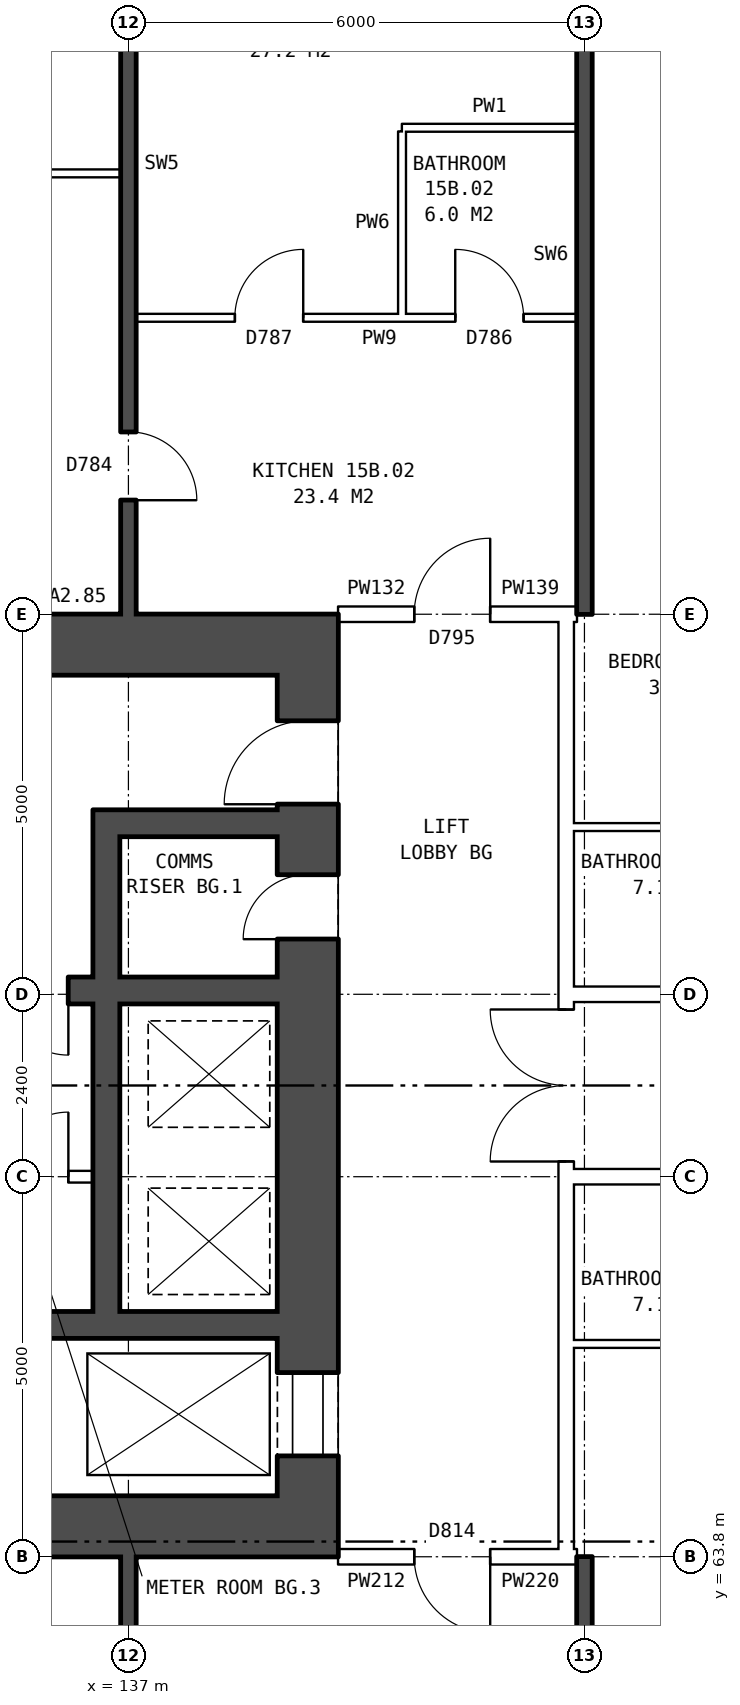
"""IFC4 building model, lengths in metres.
Left out: names, types, materials, properties, quantities, classifications, styles, units other than length and angle.
Written with IfcOpenShell. Run it as: python <this file> out.ifc"""

import sys

from ifc_helpers import new_model, si_unit, direction, frame, frame_2d, origin, place, context, subcontext, project, spatial, rectangle, extrude, element, fill, save


model = new_model("IFC4")
c1 = context("Model", 3, precision=1e-05, world=origin(), true_north=direction((0.0, 1.0)))
c2 = subcontext(c1, "Body", "Model", "MODEL_VIEW")
j1 = project(units=[si_unit("LENGTHUNIT", "METRE"), si_unit("PLANEANGLEUNIT", "RADIAN")], contexts=[c1])
p1 = place(None, origin())
s1 = spatial("IfcSite", under=j1, at=p1, CompositionType="ELEMENT")
p2 = place(p1, origin())
s2 = spatial("IfcBuilding", under=s1, at=p2, CompositionType="ELEMENT")
p3 = place(p2, frame((0.0, 0.0, 56.7)))
s3 = spatial("IfcBuildingStorey", under=s2, at=p3, CompositionType="ELEMENT", Elevation=56.7)
p4 = place(p3, frame((139.36, 64.6, 0.0), z_axis=(0.0, 0.0, 1.0), x_axis=(0.0, 1.0, 0.0)))
e1 = element("IfcWall", 1, at=p4, inside=s3, PredefinedType="SHEAR", context=c2, shape_type="SweptSolid", body=[
    extrude(rectangle(XDim=10.8, YDim=0.8, at=frame_2d((5.4, 0.0))), origin(), (0.0, 0.0, 1.0), 2.85),
])
p5 = place(p4, frame((0.525, 0.0, 0.0)))
e2 = element("IfcOpeningElement", 2, at=p5, cuts=e1, PredefinedType="OPENING", context=c2, shape_type="SweptSolid", body=[
    extrude(rectangle(XDim=1.1, YDim=2.1, at=frame_2d((0.55, 1.05))), frame((0.0, 0.41, 0.0), z_axis=(0.0, -1.0, 0.0), x_axis=(1.0, 0.0, 0.0)), (0.0, 0.0, 1.0), 0.82),
])
p6 = place(p4, frame((9.1, 0.0, 0.0)))
e3 = element("IfcOpeningElement", 3, at=p6, cuts=e1, PredefinedType="OPENING", context=c2, shape_type="SweptSolid", body=[
    extrude(rectangle(XDim=1.1, YDim=2.1, at=frame_2d((0.55, 1.05))), frame((0.0, 0.41, 0.0), z_axis=(0.0, -1.0, 0.0), x_axis=(1.0, 0.0, 0.0)), (0.0, 0.0, 1.0), 0.82),
])
p7 = place(p4, frame((7.325, 0.0, 0.0)))
e4 = element("IfcOpeningElement", 4, at=p7, cuts=e1, PredefinedType="OPENING", context=c2, shape_type="SweptSolid", body=[
    extrude(rectangle(XDim=0.85, YDim=2.1, at=frame_2d((0.425, 1.05))), frame((0.0, 0.41, 0.0), z_axis=(0.0, -1.0, 0.0), x_axis=(1.0, 0.0, 0.0)), (0.0, 0.0, 1.0), 0.82),
])
for number, where, z_axis, x_axis in (
    (5, (139.76, 64.2, 0.0), (0.0, 0.0, 1.0), (-1.0, 0.0, 0.0)),
    (6, (139.76, 75.8, 0.0), (0.0, 0.0, 1.0), (-1.0, 0.0, 0.0)),
):
    element("IfcWall", number, at=place(p3, frame(where, z_axis=z_axis, x_axis=x_axis)), inside=s3, PredefinedType="SHEAR", context=c2, shape_type="SweptSolid", body=[
        extrude(rectangle(XDim=8.4, YDim=0.8, at=frame_2d((4.2, 0.0))), origin(), (0.0, 0.0, 1.0), 2.85),
    ])
p8 = place(p3, frame((138.96, 66.85, 0.0), z_axis=(0.0, 0.0, 1.0), x_axis=(-1.0, 0.0, 0.0)))
e7 = element("IfcWall", 7, at=p8, inside=s3, PredefinedType="SHEAR", context=c2, shape_type="SweptSolid", body=[
    extrude(rectangle(XDim=3.925, YDim=0.35, at=frame_2d((1.962, 0.0))), origin(), (0.0, 0.0, 1.0), 2.85),
])
p9 = place(p3, frame((136.535, 68.8, 0.0), z_axis=(0.0, 0.0, 1.0), x_axis=(-1.0, 0.0, 0.0)))
e8 = element("IfcWall", 8, at=p9, inside=s3, PredefinedType="PARTITIONING", context=c2, shape_type="SweptSolid", body=[
    extrude(rectangle(XDim=1.5, YDim=0.15, at=frame_2d((0.75, 0.0))), origin(), (0.0, 0.0, 1.0), 2.85),
])
p10 = place(p9, frame((0.325, 0.0, 0.0)))
e9 = element("IfcOpeningElement", 9, at=p10, cuts=e8, PredefinedType="OPENING", context=c2, shape_type="SweptSolid", body=[
    extrude(rectangle(XDim=0.85, YDim=2.1, at=frame_2d((0.425, 1.05))), frame((0.0, 0.085, 0.0), z_axis=(0.0, -1.0, 0.0), x_axis=(1.0, 0.0, 0.0)), (0.0, 0.0, 1.0), 0.17),
])
p11 = place(p3, frame((138.96, 71.25, 0.0), z_axis=(0.0, 0.0, 1.0), x_axis=(-1.0, 0.0, 0.0)))
e10 = element("IfcWall", 10, at=p11, inside=s3, PredefinedType="SHEAR", context=c2, shape_type="SweptSolid", body=[
    extrude(rectangle(XDim=6.8, YDim=0.35, at=frame_2d((3.4, 0.0))), origin(), (0.0, 0.0, 1.0), 2.85),
])
p12 = place(p11, frame((4.425, 0.0, 0.0)))
e11 = element("IfcOpeningElement", 11, at=p12, cuts=e10, PredefinedType="OPENING", context=c2, shape_type="SweptSolid", body=[
    extrude(rectangle(XDim=1.1, YDim=2.1, at=frame_2d((0.55, 1.05))), frame((0.0, 0.185, 0.0), z_axis=(0.0, -1.0, 0.0), x_axis=(1.0, 0.0, 0.0)), (0.0, 0.0, 1.0), 0.37),
])
p13 = place(p11, frame((2.75, 0.0, 0.0)))
e12 = element("IfcOpeningElement", 12, at=p13, cuts=e10, PredefinedType="OPENING", context=c2, shape_type="SweptSolid", body=[
    extrude(rectangle(XDim=0.85, YDim=2.1, at=frame_2d((0.425, 1.05))), frame((0.0, 0.185, 0.0), z_axis=(0.0, -1.0, 0.0), x_axis=(1.0, 0.0, 0.0)), (0.0, 0.0, 1.0), 0.37),
])
p14 = place(p3, frame((138.96, 73.45, 0.0), z_axis=(0.0, 0.0, 1.0), x_axis=(-1.0, 0.0, 0.0)))
e13 = element("IfcWall", 13, at=p14, inside=s3, PredefinedType="SHEAR", context=c2, shape_type="SweptSolid", body=[
    extrude(rectangle(XDim=2.075, YDim=0.35, at=frame_2d((1.038, 0.0))), origin(), (0.0, 0.0, 1.0), 2.85),
])
p15 = place(p3, frame((136.71, 67.025, 0.0), z_axis=(0.0, 0.0, 1.0), x_axis=(0.0, 1.0, 0.0)))
e14 = element("IfcWall", 14, at=p15, inside=s3, PredefinedType="SHEAR", context=c2, shape_type="SweptSolid", body=[
    extrude(rectangle(XDim=4.05, YDim=0.35, at=frame_2d((2.025, 0.0))), origin(), (0.0, 0.0, 1.0), 2.85),
])
p16 = place(p3, frame((136.71, 71.425, 0.0), z_axis=(0.0, 0.0, 1.0), x_axis=(0.0, 1.0, 0.0)))
e15 = element("IfcWall", 15, at=p16, inside=s3, PredefinedType="SHEAR", context=c2, shape_type="SweptSolid", body=[
    extrude(rectangle(XDim=2.2, YDim=0.35, at=frame_2d((1.1, 0.0))), origin(), (0.0, 0.0, 1.0), 2.85),
])
p17 = place(p3, frame((142.76, 63.9, 0.0), z_axis=(0.0, 0.0, 1.0), x_axis=(0.0, 1.0, 0.0)))
e16 = element("IfcWall", 16, at=p17, inside=s3, PredefinedType="PARTITIONING", context=c2, shape_type="SweptSolid", body=[
    extrude(rectangle(XDim=12.2, YDim=0.2, at=frame_2d((6.1, 0.0))), origin(), (0.0, 0.0, 1.0), 2.85),
])
p18 = place(p17, frame((5.1, 0.0, 0.0)))
e17 = element("IfcOpeningElement", 17, at=p18, cuts=e16, PredefinedType="OPENING", context=c2, shape_type="SweptSolid", body=[
    extrude(rectangle(XDim=2.0, YDim=2.1, at=frame_2d((1.0, 1.05))), frame((0.0, 0.11, 0.0), z_axis=(0.0, -1.0, 0.0), x_axis=(1.0, 0.0, 0.0)), (0.0, 0.0, 1.0), 0.22),
])
p19 = place(p3, frame((139.76, 63.8, 0.0), z_axis=(0.0, 0.0, 1.0), x_axis=(1.0, 0.0, 0.0)))
e18 = element("IfcWall", 18, at=p19, inside=s3, PredefinedType="PARTITIONING", context=c2, shape_type="SweptSolid", body=[
    extrude(rectangle(XDim=3.0, YDim=0.2, at=frame_2d((1.5, 0.0))), origin(), (0.0, 0.0, 1.0), 2.85),
])
p20 = place(p19, frame((1.0, 0.0, 0.0)))
e19 = element("IfcOpeningElement", 19, at=p20, cuts=e18, PredefinedType="OPENING", context=c2, shape_type="SweptSolid", body=[
    extrude(rectangle(XDim=1.0, YDim=2.1, at=frame_2d((0.5, 1.05))), frame((0.0, 0.11, 0.0), z_axis=(0.0, -1.0, 0.0), x_axis=(1.0, 0.0, 0.0)), (0.0, 0.0, 1.0), 0.22),
])
p21 = place(p3, frame((142.76, 63.8, 0.0), z_axis=(0.0, 0.0, 1.0), x_axis=(1.0, 0.0, 0.0)))
e20 = element("IfcWall", 20, at=p21, inside=s3, PredefinedType="PARTITIONING", context=c2, shape_type="SweptSolid", body=[
    extrude(rectangle(XDim=0.14, YDim=0.2, at=frame_2d((0.07, 0.0))), origin(), (0.0, 0.0, 1.0), 2.85),
])
p22 = place(p3, frame((142.76, 66.6, 0.0), z_axis=(0.0, 0.0, 1.0), x_axis=(1.0, 0.0, 0.0)))
e21 = element("IfcWall", 21, at=p22, inside=s3, PredefinedType="PARTITIONING", context=c2, shape_type="SweptSolid", body=[
    extrude(rectangle(XDim=3.24, YDim=0.1, at=frame_2d((1.62, 0.0))), origin(), (0.0, 0.0, 1.0), 2.85),
])
p23 = place(p3, frame((142.76, 68.8, 0.0), z_axis=(0.0, 0.0, 1.0), x_axis=(1.0, 0.0, 0.0)))
e22 = element("IfcWall", 22, at=p23, inside=s3, PredefinedType="PARTITIONING", context=c2, shape_type="SweptSolid", body=[
    extrude(rectangle(XDim=14.48, YDim=0.2, at=frame_2d((7.24, 0.0))), origin(), (0.0, 0.0, 1.0), 2.85),
])
p24 = place(p23, frame((4.24, 0.0, 0.0)))
e23 = element("IfcOpeningElement", 23, at=p24, cuts=e22, PredefinedType="OPENING", context=c2, shape_type="SweptSolid", body=[
    extrude(rectangle(XDim=1.0, YDim=2.1, at=frame_2d((0.5, 1.05))), frame((0.0, 0.11, 0.0), z_axis=(0.0, -1.0, 0.0), x_axis=(1.0, 0.0, 0.0)), (0.0, 0.0, 1.0), 0.22),
])
p25 = place(p23, frame((7.24, 0.0, 0.0)))
e24 = element("IfcOpeningElement", 24, at=p25, cuts=e22, PredefinedType="OPENING", context=c2, shape_type="SweptSolid", body=[
    extrude(rectangle(XDim=1.0, YDim=2.1, at=frame_2d((0.5, 1.05))), frame((0.0, 0.11, 0.0), z_axis=(0.0, -1.0, 0.0), x_axis=(1.0, 0.0, 0.0)), (0.0, 0.0, 1.0), 0.22),
])
p26 = place(p3, frame((142.76, 71.2, 0.0), z_axis=(0.0, 0.0, 1.0), x_axis=(1.0, 0.0, 0.0)))
e25 = element("IfcWall", 25, at=p26, inside=s3, PredefinedType="PARTITIONING", context=c2, shape_type="SweptSolid", body=[
    extrude(rectangle(XDim=14.48, YDim=0.2, at=frame_2d((7.24, 0.0))), origin(), (0.0, 0.0, 1.0), 2.85),
])
p27 = place(p26, frame((4.24, 0.0, 0.0)))
e26 = element("IfcOpeningElement", 26, at=p27, cuts=e25, PredefinedType="OPENING", context=c2, shape_type="SweptSolid", body=[
    extrude(rectangle(XDim=1.0, YDim=2.1, at=frame_2d((0.5, 1.05))), frame((0.0, 0.11, 0.0), z_axis=(0.0, -1.0, 0.0), x_axis=(1.0, 0.0, 0.0)), (0.0, 0.0, 1.0), 0.22),
])
p28 = place(p26, frame((7.24, 0.0, 0.0)))
e27 = element("IfcOpeningElement", 27, at=p28, cuts=e25, PredefinedType="OPENING", context=c2, shape_type="SweptSolid", body=[
    extrude(rectangle(XDim=1.0, YDim=2.1, at=frame_2d((0.5, 1.05))), frame((0.0, 0.11, 0.0), z_axis=(0.0, -1.0, 0.0), x_axis=(1.0, 0.0, 0.0)), (0.0, 0.0, 1.0), 0.22),
])
p29 = place(p3, frame((142.76, 73.4, 0.0), z_axis=(0.0, 0.0, 1.0), x_axis=(1.0, 0.0, 0.0)))
e28 = element("IfcWall", 28, at=p29, inside=s3, PredefinedType="PARTITIONING", context=c2, shape_type="SweptSolid", body=[
    extrude(rectangle(XDim=3.24, YDim=0.1, at=frame_2d((1.62, 0.0))), origin(), (0.0, 0.0, 1.0), 2.85),
])
p30 = place(p3, frame((139.76, 76.2, 0.0), z_axis=(0.0, 0.0, 1.0), x_axis=(1.0, 0.0, 0.0)))
e29 = element("IfcWall", 29, at=p30, inside=s3, PredefinedType="PARTITIONING", context=c2, shape_type="SweptSolid", body=[
    extrude(rectangle(XDim=3.0, YDim=0.2, at=frame_2d((1.5, 0.0))), origin(), (0.0, 0.0, 1.0), 2.85),
])
p31 = place(p30, frame((1.0, 0.0, 0.0)))
e30 = element("IfcOpeningElement", 30, at=p31, cuts=e29, PredefinedType="OPENING", context=c2, shape_type="SweptSolid", body=[
    extrude(rectangle(XDim=1.0, YDim=2.1, at=frame_2d((0.5, 1.05))), frame((0.0, 0.11, 0.0), z_axis=(0.0, -1.0, 0.0), x_axis=(1.0, 0.0, 0.0)), (0.0, 0.0, 1.0), 0.22),
])
p32 = place(p3, frame((142.76, 76.2, 0.0), z_axis=(0.0, 0.0, 1.0), x_axis=(1.0, 0.0, 0.0)))
e31 = element("IfcWall", 31, at=p32, inside=s3, PredefinedType="PARTITIONING", context=c2, shape_type="SweptSolid", body=[
    extrude(rectangle(XDim=0.14, YDim=0.2, at=frame_2d((0.07, 0.0))), origin(), (0.0, 0.0, 1.0), 2.85),
])
p33 = place(p3, frame((137.1, 80.1, 0.0), z_axis=(0.0, 0.0, 1.0), x_axis=(1.0, 0.0, 0.0)))
e32 = element("IfcWall", 32, at=p33, inside=s3, PredefinedType="PARTITIONING", context=c2, shape_type="SweptSolid", body=[
    extrude(rectangle(XDim=5.8, YDim=0.1, at=frame_2d((2.9, 0.0))), origin(), (0.0, 0.0, 1.0), 2.85),
])
p34 = place(p33, frame((1.3, 0.0, 0.0)))
e33 = element("IfcOpeningElement", 33, at=p34, cuts=e32, PredefinedType="OPENING", context=c2, shape_type="SweptSolid", body=[
    extrude(rectangle(XDim=0.9, YDim=2.1, at=frame_2d((0.45, 1.05))), frame((0.0, 0.06, 0.0), z_axis=(0.0, -1.0, 0.0), x_axis=(1.0, 0.0, 0.0)), (0.0, 0.0, 1.0), 0.12),
])
p35 = place(p33, frame((4.2, 0.0, 0.0)))
e34 = element("IfcOpeningElement", 34, at=p35, cuts=e32, PredefinedType="OPENING", context=c2, shape_type="SweptSolid", body=[
    extrude(rectangle(XDim=0.9, YDim=2.1, at=frame_2d((0.45, 1.05))), frame((0.0, 0.06, 0.0), z_axis=(0.0, -1.0, 0.0), x_axis=(1.0, 0.0, 0.0)), (0.0, 0.0, 1.0), 0.12),
])
p36 = place(p3, frame((131.36, 82.0, 0.0), z_axis=(0.0, 0.0, 1.0), x_axis=(1.0, 0.0, 0.0)))
e35 = element("IfcWall", 35, at=p36, inside=s3, PredefinedType="PARTITIONING", context=c2, shape_type="SweptSolid", body=[
    extrude(rectangle(XDim=5.54, YDim=0.1, at=frame_2d((2.77, 0.0))), origin(), (0.0, 0.0, 1.0), 2.85),
])
p37 = place(p36, frame((2.32, 0.0, 0.0)))
e36 = element("IfcOpeningElement", 36, at=p37, cuts=e35, PredefinedType="OPENING", context=c2, shape_type="SweptSolid", body=[
    extrude(rectangle(XDim=0.9, YDim=2.1, at=frame_2d((0.45, 1.05))), frame((0.0, 0.06, 0.0), z_axis=(0.0, -1.0, 0.0), x_axis=(1.0, 0.0, 0.0)), (0.0, 0.0, 1.0), 0.12),
])
p38 = place(p3, frame((140.6, 82.6, 0.0), z_axis=(0.0, 0.0, 1.0), x_axis=(1.0, 0.0, 0.0)))
e37 = element("IfcWall", 37, at=p38, inside=s3, PredefinedType="PARTITIONING", context=c2, shape_type="SweptSolid", body=[
    extrude(rectangle(XDim=2.3, YDim=0.1, at=frame_2d((1.15, 0.0))), origin(), (0.0, 0.0, 1.0), 2.85),
])
p39 = place(p3, frame((137.0, 54.36, 0.0), z_axis=(0.0, 0.0, 1.0), x_axis=(0.0, 1.0, 0.0)))
e38 = element("IfcWall", 38, at=p39, inside=s3, PredefinedType="SOLIDWALL", context=c2, shape_type="SweptSolid", body=[
    extrude(rectangle(XDim=9.44, YDim=0.2, at=frame_2d((4.72, 0.0))), origin(), (0.0, 0.0, 1.0), 2.85),
])
p40 = place(p39, frame((2.47, 0.0, 0.0)))
e39 = element("IfcOpeningElement", 39, at=p40, cuts=e38, PredefinedType="OPENING", context=c2, shape_type="SweptSolid", body=[
    extrude(rectangle(XDim=0.9, YDim=2.1, at=frame_2d((0.45, 1.05))), frame((0.0, 0.11, 0.0), z_axis=(0.0, -1.0, 0.0), x_axis=(1.0, 0.0, 0.0)), (0.0, 0.0, 1.0), 0.22),
])
p41 = place(p39, frame((7.59, 0.0, 0.0)))
e40 = element("IfcOpeningElement", 40, at=p41, cuts=e38, PredefinedType="OPENING", context=c2, shape_type="SweptSolid", body=[
    extrude(rectangle(XDim=0.9, YDim=2.1, at=frame_2d((0.45, 1.05))), frame((0.0, 0.11, 0.0), z_axis=(0.0, -1.0, 0.0), x_axis=(1.0, 0.0, 0.0)), (0.0, 0.0, 1.0), 0.22),
])
p42 = place(p3, frame((137.0, 76.2, 0.0), z_axis=(0.0, 0.0, 1.0), x_axis=(0.0, 1.0, 0.0)))
e41 = element("IfcWall", 41, at=p42, inside=s3, PredefinedType="SOLIDWALL", context=c2, shape_type="SweptSolid", body=[
    extrude(rectangle(XDim=9.44, YDim=0.2, at=frame_2d((4.72, 0.0))), origin(), (0.0, 0.0, 1.0), 2.85),
])
p43 = place(p42, frame((1.5, 0.0, 0.0)))
e42 = element("IfcOpeningElement", 42, at=p43, cuts=e41, PredefinedType="OPENING", context=c2, shape_type="SweptSolid", body=[
    extrude(rectangle(XDim=0.9, YDim=2.1, at=frame_2d((0.45, 1.05))), frame((0.0, 0.11, 0.0), z_axis=(0.0, -1.0, 0.0), x_axis=(1.0, 0.0, 0.0)), (0.0, 0.0, 1.0), 0.22),
])
p44 = place(p3, frame((140.6, 80.15, 0.0), z_axis=(0.0, 0.0, 1.0), x_axis=(0.0, 1.0, 0.0)))
e43 = element("IfcWall", 43, at=p44, inside=s3, PredefinedType="PARTITIONING", context=c2, shape_type="SweptSolid", body=[
    extrude(rectangle(XDim=2.4, YDim=0.1, at=frame_2d((1.2, 0.0))), origin(), (0.0, 0.0, 1.0), 2.85),
])
for number, where, z_axis, x_axis in (
    (44, (143.0, 54.36, 0.0), (0.0, 0.0, 1.0), (0.0, 1.0, 0.0)),
    (45, (143.0, 76.2, 0.0), (0.0, 0.0, 1.0), (0.0, 1.0, 0.0)),
):
    element("IfcWall", number, at=place(p3, frame(where, z_axis=z_axis, x_axis=x_axis)), inside=s3, PredefinedType="SOLIDWALL", context=c2, shape_type="SweptSolid", body=[
        extrude(rectangle(XDim=9.44, YDim=0.2, at=frame_2d((4.72, 0.0))), origin(), (0.0, 0.0, 1.0), 2.85),
    ])
p45 = place(p5, origin())
e46 = element("IfcDoor", 46, at=p45, inside=s3, OperationType="DOUBLE_DOOR_SLIDING", PredefinedType="DOOR", context=c2, shape_type="SweptSolid", body=[
    extrude(rectangle(XDim=1.1, YDim=2.1, at=frame_2d((0.55, 1.05))), frame((0.0, 0.385, 0.0), z_axis=(0.0, -1.0, 0.0), x_axis=(1.0, 0.0, 0.0)), (0.0, 0.0, 1.0), 0.05),
])
fill(e2, e46)
p46 = place(p6, origin())
e47 = element("IfcDoor", 47, at=p46, inside=s3, OperationType="SINGLE_SWING_LEFT", PredefinedType="DOOR", context=c2, shape_type="SweptSolid", body=[
    extrude(rectangle(XDim=1.1, YDim=2.1, at=frame_2d((0.55, 1.05))), frame((0.0, 0.385, 0.0), z_axis=(0.0, -1.0, 0.0), x_axis=(1.0, 0.0, 0.0)), (0.0, 0.0, 1.0), 0.05),
])
fill(e3, e47)
p47 = place(p7, origin())
e48 = element("IfcDoor", 48, at=p47, inside=s3, OperationType="SINGLE_SWING_LEFT", PredefinedType="DOOR", context=c2, shape_type="SweptSolid", body=[
    extrude(rectangle(XDim=0.85, YDim=2.1, at=frame_2d((0.425, 1.05))), frame((0.0, 0.385, 0.0), z_axis=(0.0, -1.0, 0.0), x_axis=(1.0, 0.0, 0.0)), (0.0, 0.0, 1.0), 0.05),
])
fill(e4, e48)
p48 = place(p13, origin())
e49 = element("IfcDoor", 49, at=p48, inside=s3, OperationType="SINGLE_SWING_LEFT", PredefinedType="DOOR", context=c2, shape_type="SweptSolid", body=[
    extrude(rectangle(XDim=0.85, YDim=2.1, at=frame_2d((0.425, 1.05))), frame((0.0, 0.025, 0.0), z_axis=(0.0, -1.0, 0.0), x_axis=(1.0, 0.0, 0.0)), (0.0, 0.0, 1.0), 0.05),
])
fill(e12, e49)
p49 = place(p10, frame((0.85, 0.0, 0.0), z_axis=(0.0, 0.0, 1.0), x_axis=(-1.0, 0.0, 0.0)))
e50 = element("IfcDoor", 50, at=p49, inside=s3, OperationType="SINGLE_SWING_RIGHT", PredefinedType="DOOR", context=c2, shape_type="SweptSolid", body=[
    extrude(rectangle(XDim=0.85, YDim=2.1, at=frame_2d((0.425, 1.05))), frame((0.0, 0.025, 0.0), z_axis=(0.0, -1.0, 0.0), x_axis=(1.0, 0.0, 0.0)), (0.0, 0.0, 1.0), 0.05),
])
fill(e9, e50)
p50 = place(p18, origin())
e51 = element("IfcDoor", 51, at=p50, inside=s3, OperationType="DOUBLE_DOOR_SINGLE_SWING", PredefinedType="DOOR", context=c2, shape_type="SweptSolid", body=[
    extrude(rectangle(XDim=2.0, YDim=2.1, at=frame_2d((1.0, 1.05))), frame((0.0, 0.025, 0.0), z_axis=(0.0, -1.0, 0.0), x_axis=(1.0, 0.0, 0.0)), (0.0, 0.0, 1.0), 0.05),
])
fill(e17, e51)
p51 = place(p20, frame((1.0, 0.0, 0.0), z_axis=(0.0, 0.0, 1.0), x_axis=(-1.0, 0.0, 0.0)))
e52 = element("IfcDoor", 52, at=p51, inside=s3, OperationType="SINGLE_SWING_LEFT", PredefinedType="DOOR", context=c2, shape_type="SweptSolid", body=[
    extrude(rectangle(XDim=1.0, YDim=2.1, at=frame_2d((0.5, 1.05))), frame((0.0, 0.025, 0.0), z_axis=(0.0, -1.0, 0.0), x_axis=(1.0, 0.0, 0.0)), (0.0, 0.0, 1.0), 0.05),
])
fill(e19, e52)
p52 = place(p34, origin())
e53 = element("IfcDoor", 53, at=p52, inside=s3, OperationType="SINGLE_SWING_RIGHT", PredefinedType="DOOR", context=c2, shape_type="SweptSolid", body=[
    extrude(rectangle(XDim=0.9, YDim=2.1, at=frame_2d((0.45, 1.05))), frame((0.0, 0.025, 0.0), z_axis=(0.0, -1.0, 0.0), x_axis=(1.0, 0.0, 0.0)), (0.0, 0.0, 1.0), 0.05),
])
fill(e33, e53)
p53 = place(p31, origin())
e54 = element("IfcDoor", 54, at=p53, inside=s3, OperationType="SINGLE_SWING_RIGHT", PredefinedType="DOOR", context=c2, shape_type="SweptSolid", body=[
    extrude(rectangle(XDim=1.0, YDim=2.1, at=frame_2d((0.5, 1.05))), frame((0.0, 0.025, 0.0), z_axis=(0.0, -1.0, 0.0), x_axis=(1.0, 0.0, 0.0)), (0.0, 0.0, 1.0), 0.05),
])
fill(e30, e54)
p54 = place(p43, frame((0.9, 0.0, 0.0), z_axis=(0.0, 0.0, 1.0), x_axis=(-1.0, 0.0, 0.0)))
e55 = element("IfcDoor", 55, at=p54, inside=s3, OperationType="SINGLE_SWING_RIGHT", PredefinedType="DOOR", context=c2, shape_type="SweptSolid", body=[
    extrude(rectangle(XDim=0.9, YDim=2.1, at=frame_2d((0.45, 1.05))), frame((0.0, 0.025, 0.0), z_axis=(0.0, -1.0, 0.0), x_axis=(1.0, 0.0, 0.0)), (0.0, 0.0, 1.0), 0.05),
])
fill(e42, e55)
p55 = place(p35, origin())
e56 = element("IfcDoor", 56, at=p55, inside=s3, OperationType="SINGLE_SWING_LEFT", PredefinedType="DOOR", context=c2, shape_type="SweptSolid", body=[
    extrude(rectangle(XDim=0.9, YDim=2.1, at=frame_2d((0.45, 1.05))), frame((0.0, 0.025, 0.0), z_axis=(0.0, -1.0, 0.0), x_axis=(1.0, 0.0, 0.0)), (0.0, 0.0, 1.0), 0.05),
])
fill(e34, e56)
save(model, sys.argv[1])
